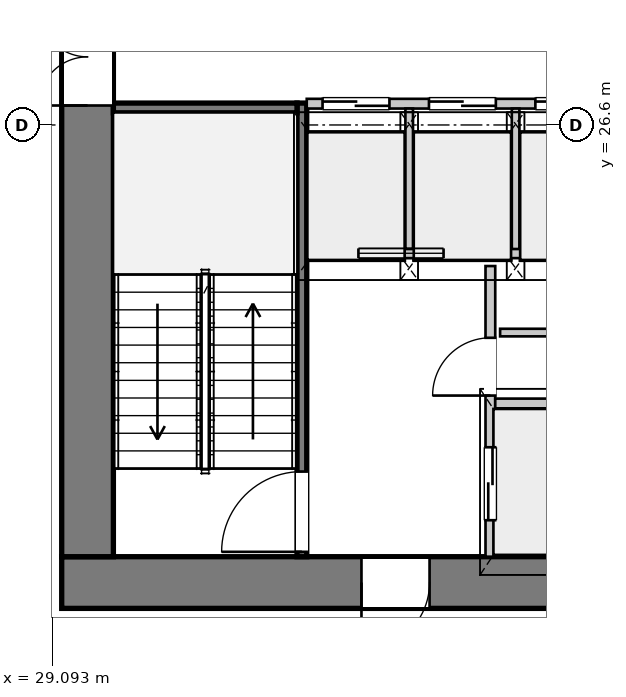
"""IFC4 building model, lengths in metres.
Left out: names, types, materials, properties, quantities, classifications, styles, units other than length and angle.
Written with IfcOpenShell. Run it as: python <this file> out.ifc"""

import sys

from ifc_helpers import new_model, si_unit, direction, frame, frame_2d, origin, place, context, subcontext, project, spatial, rectangle, extrude, source, transform, mapped, element, fill, save


model = new_model("IFC4")
c1 = context("Model", 3, precision=1e-05, world=origin(), true_north=direction((0.0, 1.0)))
c2 = subcontext(c1, "Body", "Model", "MODEL_VIEW")
j1 = project(units=[si_unit("LENGTHUNIT", "METRE"), si_unit("PLANEANGLEUNIT", "RADIAN")], contexts=[c1])
p1 = place(None, origin())
s1 = spatial("IfcSite", under=j1, at=p1, CompositionType="ELEMENT")
p2 = place(p1, origin())
s2 = spatial("IfcBuilding", under=s1, at=p2, CompositionType="ELEMENT")
p3 = place(p2, frame((0.0, 0.0, 71.9)))
s3 = spatial("IfcBuildingStorey", under=s2, at=p3, CompositionType="ELEMENT", Elevation=71.9)
p4 = place(p3, frame((46.75, 19.075, 0.0), z_axis=(0.0, 0.0, 1.0), x_axis=(-1.0, 0.0, 0.0)))
e1 = element("IfcWall", 1, at=p4, inside=s3, PredefinedType="SHEAR", context=c2, shape_type="SweptSolid", body=[
    extrude(rectangle(XDim=17.5, YDim=0.85, at=frame_2d((8.75, 0.0))), origin(), (0.0, 0.0, 1.0), 3.75),
])
p5 = place(p4, frame((4.95, 0.0, 0.0)))
e2 = element("IfcOpeningElement", 2, at=p5, cuts=e1, PredefinedType="OPENING", context=c2, shape_type="SweptSolid", body=[
    extrude(rectangle(XDim=1.12, YDim=2.25, at=frame_2d((0.56, 1.125))), frame((0.0, 0.435, 0.0), z_axis=(0.0, -1.0, 0.0), x_axis=(1.0, 0.0, 0.0)), (0.0, 0.0, 1.0), 0.87),
])
p6 = place(p4, frame((11.45, 0.0, 0.0)))
e3 = element("IfcOpeningElement", 3, at=p6, cuts=e1, PredefinedType="OPENING", context=c2, shape_type="SweptSolid", body=[
    extrude(rectangle(XDim=1.12, YDim=2.25, at=frame_2d((0.56, 1.125))), frame((0.0, 0.435, 0.0), z_axis=(0.0, -1.0, 0.0), x_axis=(1.0, 0.0, 0.0)), (0.0, 0.0, 1.0), 0.87),
])
p7 = place(p3, frame((29.675, 19.5, 0.0), z_axis=(0.0, 0.0, 1.0), x_axis=(0.0, 1.0, 0.0)))
e4 = element("IfcWall", 4, at=p7, inside=s3, PredefinedType="SHEAR", context=c2, shape_type="SweptSolid", body=[
    extrude(rectangle(XDim=14.2, YDim=0.85, at=frame_2d((7.1, 0.0))), origin(), (0.0, 0.0, 1.0), 3.75),
])
p8 = place(p7, frame((7.42, 0.0, 0.0)))
e5 = element("IfcOpeningElement", 5, at=p8, cuts=e4, PredefinedType="OPENING", context=c2, shape_type="SweptSolid", body=[
    extrude(rectangle(XDim=1.6, YDim=2.2, at=frame_2d((0.8, 1.1))), frame((0.0, 0.435, 0.0), z_axis=(0.0, -1.0, 0.0), x_axis=(1.0, 0.0, 0.0)), (0.0, 0.0, 1.0), 0.87),
])
p9 = place(p3, frame((33.2, 19.5, 0.0), z_axis=(0.0, 0.0, 1.0), x_axis=(0.0, 1.0, 0.0)))
e6 = element("IfcWall", 6, at=p9, inside=s3, PredefinedType="PARTITIONING", context=c2, shape_type="SweptSolid", body=[
    extrude(rectangle(XDim=7.46, YDim=0.16, at=frame_2d((3.73, 0.0))), origin(), (0.0, 0.0, 1.0), 3.75),
])
p10 = place(p9, frame((0.08, 0.0, 0.0)))
e7 = element("IfcOpeningElement", 7, at=p10, cuts=e6, PredefinedType="OPENING", context=c2, shape_type="SweptSolid", body=[
    extrude(rectangle(XDim=1.32, YDim=2.2, at=frame_2d((0.66, 1.1))), frame((0.0, 0.09, 0.0), z_axis=(0.0, -1.0, 0.0), x_axis=(1.0, 0.0, 0.0)), (0.0, 0.0, 1.0), 0.18),
])
p11 = place(p3, frame((30.1, 26.88, 0.0), z_axis=(0.0, 0.0, 1.0), x_axis=(1.0, 0.0, 0.0)))
e8 = element("IfcWall", 8, at=p11, inside=s3, PredefinedType="PARTITIONING", context=c2, shape_type="SweptSolid", body=[
    extrude(rectangle(XDim=3.02, YDim=0.16, at=frame_2d((1.51, 0.0))), origin(), (0.0, 0.0, 1.0), 3.75),
])
p12 = place(p3, frame((36.3, 19.5, 0.0), z_axis=(0.0, 0.0, 1.0), x_axis=(0.0, 1.0, 0.0)))
e9 = element("IfcWall", 9, at=p12, inside=s3, PredefinedType="PARTITIONING", context=c2, shape_type="SweptSolid", body=[
    extrude(rectangle(XDim=4.78, YDim=0.16, at=frame_2d((2.39, 0.0))), origin(), (0.0, 0.0, 1.0), 3.75),
])
p13 = place(p12, frame((0.6, 0.0, 0.0)))
e10 = element("IfcOpeningElement", 10, at=p13, cuts=e9, PredefinedType="OPENING", context=c2, shape_type="SweptSolid", body=[
    extrude(rectangle(XDim=1.2, YDim=2.2, at=frame_2d((0.6, 1.1))), frame((0.0, 0.09, 0.0), z_axis=(0.0, -1.0, 0.0), x_axis=(1.0, 0.0, 0.0)), (0.0, 0.0, 1.0), 0.18),
])
p14 = place(p12, frame((2.65, 0.0, 0.0)))
e11 = element("IfcOpeningElement", 11, at=p14, cuts=e9, PredefinedType="OPENING", context=c2, shape_type="SweptSolid", body=[
    extrude(rectangle(XDim=0.95, YDim=2.1, at=frame_2d((0.475, 1.05))), frame((0.0, 0.09, 0.0), z_axis=(0.0, -1.0, 0.0), x_axis=(1.0, 0.0, 0.0)), (0.0, 0.0, 1.0), 0.18),
])
p15 = place(p3, frame((36.38, 22.02, 0.0), z_axis=(0.0, 0.0, 1.0), x_axis=(1.0, 0.0, 0.0)))
e12 = element("IfcWall", 12, at=p15, inside=s3, PredefinedType="PARTITIONING", context=c2, shape_type="SweptSolid", body=[
    extrude(rectangle(XDim=3.24, YDim=0.16, at=frame_2d((1.62, 0.0))), origin(), (0.0, 0.0, 1.0), 3.75),
])
p16 = place(p3, frame((33.28, 24.49, 0.0), z_axis=(0.0, 0.0, 1.0), x_axis=(1.0, 0.0, 0.0)))
e13 = element("IfcWall", 13, at=p16, inside=s3, PredefinedType="PARTITIONING", context=c2, shape_type="SweptSolid", body=[
    extrude(rectangle(XDim=9.44, YDim=0.16, at=frame_2d((4.72, 0.0))), origin(), (0.0, 0.0, 1.0), 3.75),
])
p17 = place(p16, frame((0.85, 0.0, 0.95)))
e14 = element("IfcOpeningElement", 14, at=p17, cuts=e13, PredefinedType="OPENING", context=c2, shape_type="SweptSolid", body=[
    extrude(rectangle(XDim=1.4, YDim=1.8, at=frame_2d((0.7, 0.9))), frame((0.0, 0.09, 0.0), z_axis=(0.0, -1.0, 0.0), x_axis=(1.0, 0.0, 0.0)), (0.0, 0.0, 1.0), 0.18),
])
p18 = place(p3, frame((36.46, 23.186, 0.0), z_axis=(0.0, 0.0, 1.0), x_axis=(1.0, 0.0, 0.0)))
e15 = element("IfcWall", 15, at=p18, inside=s3, PredefinedType="PARTITIONING", context=c2, shape_type="SweptSolid", body=[
    extrude(rectangle(XDim=3.08, YDim=0.125, at=frame_2d((1.54, 0.0))), origin(), (0.0, 0.0, 1.0), 3.75),
])
p19 = place(p18, frame((1.05, 0.0, 0.0)))
e16 = element("IfcOpeningElement", 16, at=p19, cuts=e15, PredefinedType="OPENING", context=c2, shape_type="SweptSolid", body=[
    extrude(rectangle(XDim=0.9, YDim=2.1, at=frame_2d((0.45, 1.05))), frame((0.0, 0.073, 0.0), z_axis=(0.0, -1.0, 0.0), x_axis=(1.0, 0.0, 0.0)), (0.0, 0.0, 1.0), 0.145),
])
p20 = place(p3, frame((33.28, 26.95, 0.0), z_axis=(0.0, 0.0, 1.0), x_axis=(1.0, 0.0, 0.0)))
e17 = element("IfcWall", 17, at=p20, inside=s3, PredefinedType="PARTITIONING", context=c2, shape_type="SweptSolid", body=[
    extrude(rectangle(XDim=9.44, YDim=0.16, at=frame_2d((4.72, 0.0))), origin(), (0.0, 0.0, 1.0), 3.75),
])
p21 = place(p20, frame((0.26, 0.0, 0.0)))
e18 = element("IfcOpeningElement", 18, at=p21, cuts=e17, PredefinedType="OPENING", context=c2, shape_type="SweptSolid", body=[
    extrude(rectangle(XDim=1.1, YDim=2.2, at=frame_2d((0.55, 1.1))), frame((0.0, 0.09, 0.0), z_axis=(0.0, -1.0, 0.0), x_axis=(1.0, 0.0, 0.0)), (0.0, 0.0, 1.0), 0.18),
])
p22 = place(p20, frame((2.01, 0.0, 0.0)))
e19 = element("IfcOpeningElement", 19, at=p22, cuts=e17, PredefinedType="OPENING", context=c2, shape_type="SweptSolid", body=[
    extrude(rectangle(XDim=1.1, YDim=2.2, at=frame_2d((0.55, 1.1))), frame((0.0, 0.09, 0.0), z_axis=(0.0, -1.0, 0.0), x_axis=(1.0, 0.0, 0.0)), (0.0, 0.0, 1.0), 0.18),
])
p23 = place(p20, frame((3.76, 0.0, 0.0)))
e20 = element("IfcOpeningElement", 20, at=p23, cuts=e17, PredefinedType="OPENING", context=c2, shape_type="SweptSolid", body=[
    extrude(rectangle(XDim=1.1, YDim=2.2, at=frame_2d((0.55, 1.1))), frame((0.0, 0.09, 0.0), z_axis=(0.0, -1.0, 0.0), x_axis=(1.0, 0.0, 0.0)), (0.0, 0.0, 1.0), 0.18),
])
p24 = place(p20, frame((5.51, 0.0, 0.0)))
e21 = element("IfcOpeningElement", 21, at=p24, cuts=e17, PredefinedType="OPENING", context=c2, shape_type="SweptSolid", body=[
    extrude(rectangle(XDim=1.1, YDim=2.2, at=frame_2d((0.55, 1.1))), frame((0.0, 0.09, 0.0), z_axis=(0.0, -1.0, 0.0), x_axis=(1.0, 0.0, 0.0)), (0.0, 0.0, 1.0), 0.18),
])
for number, where, z_axis, x_axis in (
    (22, (34.965, 24.56, 0.0), (0.0, 0.0, 1.0), (0.0, 1.0, 0.0)),
    (23, (36.715, 24.56, 0.0), (0.0, 0.0, 1.0), (0.0, 1.0, 0.0)),
):
    element("IfcWall", number, at=place(p3, frame(where, z_axis=z_axis, x_axis=x_axis)), inside=s3, PredefinedType="PARTITIONING", context=c2, shape_type="SweptSolid", body=[
        extrude(rectangle(XDim=2.31, YDim=0.125, at=frame_2d((1.155, 0.0))), origin(), (0.0, 0.0, 1.0), 3.75),
    ])
m1 = source(origin(), c2, "Body", "SweptSolid", [
    extrude(rectangle(XDim=1.12, YDim=2.25, at=frame_2d((0.56, 1.125))), frame((0.0, 0.025, 0.0), z_axis=(0.0, -1.0, 0.0), x_axis=(1.0, 0.0, 0.0)), (0.0, 0.0, 1.0), 0.05),
])
p25 = place(p6, origin())
e24 = element("IfcDoor", 24, at=p25, inside=s3, OperationType="SINGLE_SWING_RIGHT", PredefinedType="DOOR", context=c2, shape_type="MappedRepresentation", body=[
    mapped(m1, transform((0.0, 0.0, 0.0), x_axis=(1.0, 0.0, 0.0), y_axis=(0.0, 1.0, 0.0), z_axis=(0.0, 0.0, 1.0), scale=1.0)),
])
fill(e3, e24)
m2 = source(origin(), c2, "Body", "SweptSolid", [
    extrude(rectangle(XDim=1.6, YDim=2.2, at=frame_2d((0.8, 1.1))), frame((0.0, 0.025, 0.0), z_axis=(0.0, -1.0, 0.0), x_axis=(1.0, 0.0, 0.0)), (0.0, 0.0, 1.0), 0.05),
])
p26 = place(p8, origin())
e25 = element("IfcDoor", 25, at=p26, inside=s3, OperationType="DOUBLE_DOOR_SINGLE_SWING", PredefinedType="DOOR", context=c2, shape_type="MappedRepresentation", body=[
    mapped(m2, transform((0.0, 0.0, 0.0), x_axis=(1.0, 0.0, 0.0), y_axis=(0.0, 1.0, 0.0), z_axis=(0.0, 0.0, 1.0), scale=1.0)),
])
fill(e5, e25)
m3 = source(origin(), c2, "Body", "SweptSolid", [
    extrude(rectangle(XDim=1.32, YDim=2.2, at=frame_2d((0.66, 1.1))), frame((0.0, 0.025, 0.0), z_axis=(0.0, -1.0, 0.0), x_axis=(1.0, 0.0, 0.0)), (0.0, 0.0, 1.0), 0.05),
])
p27 = place(p10, origin())
e26 = element("IfcDoor", 26, at=p27, inside=s3, OperationType="SINGLE_SWING_LEFT", PredefinedType="DOOR", context=c2, shape_type="MappedRepresentation", body=[
    mapped(m3, transform((0.0, 0.0, 0.0), x_axis=(1.0, 0.0, 0.0), y_axis=(0.0, 1.0, 0.0), z_axis=(0.0, 0.0, 1.0), scale=1.0)),
])
fill(e7, e26)
m4 = source(origin(), c2, "Body", "SweptSolid", [
    extrude(rectangle(XDim=1.2, YDim=2.2, at=frame_2d((0.6, 1.1))), frame((0.0, 0.025, 0.0), z_axis=(0.0, -1.0, 0.0), x_axis=(1.0, 0.0, 0.0)), (0.0, 0.0, 1.0), 0.05),
])
p28 = place(p13, origin())
e27 = element("IfcDoor", 27, at=p28, inside=s3, OperationType="DOUBLE_DOOR_SLIDING", PredefinedType="DOOR", context=c2, shape_type="MappedRepresentation", body=[
    mapped(m4, transform((0.0, 0.0, 0.0), x_axis=(1.0, 0.0, 0.0), y_axis=(0.0, 1.0, 0.0), z_axis=(0.0, 0.0, 1.0), scale=1.0)),
])
fill(e10, e27)
m5 = source(origin(), c2, "Body", "SweptSolid", [
    extrude(rectangle(XDim=0.95, YDim=2.1, at=frame_2d((0.475, 1.05))), frame((0.0, 0.025, 0.0), z_axis=(0.0, -1.0, 0.0), x_axis=(1.0, 0.0, 0.0)), (0.0, 0.0, 1.0), 0.05),
])
p29 = place(p14, origin())
e28 = element("IfcDoor", 28, at=p29, inside=s3, OperationType="SINGLE_SWING_LEFT", PredefinedType="DOOR", context=c2, shape_type="MappedRepresentation", body=[
    mapped(m5, transform((0.0, 0.0, 0.0), x_axis=(1.0, 0.0, 0.0), y_axis=(0.0, 1.0, 0.0), z_axis=(0.0, 0.0, 1.0), scale=1.0)),
])
fill(e11, e28)
m6 = source(origin(), c2, "Body", "SweptSolid", [
    extrude(rectangle(XDim=1.1, YDim=2.2, at=frame_2d((0.55, 1.1))), frame((0.0, 0.025, 0.0), z_axis=(0.0, -1.0, 0.0), x_axis=(1.0, 0.0, 0.0)), (0.0, 0.0, 1.0), 0.05),
])
p30 = place(p21, origin())
e29 = element("IfcDoor", 29, at=p30, inside=s3, OperationType="DOUBLE_DOOR_SLIDING", PredefinedType="DOOR", context=c2, shape_type="MappedRepresentation", body=[
    mapped(m6, transform((0.0, 0.0, 0.0), x_axis=(1.0, 0.0, 0.0), y_axis=(0.0, 1.0, 0.0), z_axis=(0.0, 0.0, 1.0), scale=1.0)),
])
fill(e18, e29)
p31 = place(p22, origin())
e30 = element("IfcDoor", 30, at=p31, inside=s3, OperationType="DOUBLE_DOOR_SLIDING", PredefinedType="DOOR", context=c2, shape_type="MappedRepresentation", body=[
    mapped(m6, transform((0.0, 0.0, 0.0), x_axis=(1.0, 0.0, 0.0), y_axis=(0.0, 1.0, 0.0), z_axis=(0.0, 0.0, 1.0), scale=1.0)),
])
fill(e19, e30)
p32 = place(p23, origin())
e31 = element("IfcDoor", 31, at=p32, inside=s3, OperationType="DOUBLE_DOOR_SLIDING", PredefinedType="DOOR", context=c2, shape_type="MappedRepresentation", body=[
    mapped(m6, transform((0.0, 0.0, 0.0), x_axis=(1.0, 0.0, 0.0), y_axis=(0.0, 1.0, 0.0), z_axis=(0.0, 0.0, 1.0), scale=1.0)),
])
fill(e20, e31)
m7 = source(origin(), c2, "Body", "SweptSolid", [
    extrude(rectangle(XDim=1.4, YDim=1.8, at=frame_2d((0.7, 0.9))), frame((0.0, 0.03, 0.0), z_axis=(0.0, -1.0, 0.0), x_axis=(1.0, 0.0, 0.0)), (0.0, 0.0, 1.0), 0.06),
])
p33 = place(p17, origin())
e32 = element("IfcWindow", 32, at=p33, inside=s3, PartitioningType="SINGLE_PANEL", PredefinedType="WINDOW", context=c2, shape_type="MappedRepresentation", body=[
    mapped(m7, transform((0.0, 0.0, 0.0), x_axis=(1.0, 0.0, 0.0), y_axis=(0.0, 1.0, 0.0), z_axis=(0.0, 0.0, 1.0), scale=1.0)),
])
fill(e14, e32)
save(model, sys.argv[1])
